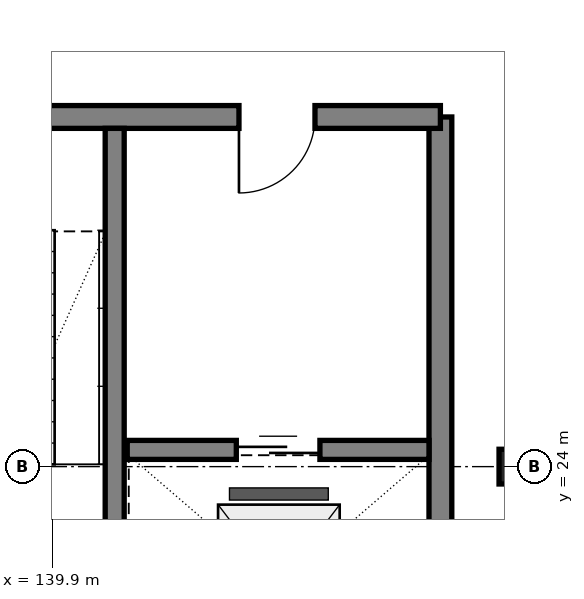
"""IFC4 building model, lengths in metres.
Left out: names, types, materials, properties, quantities, classifications, styles, units other than length and angle.
Written with IfcOpenShell. Run it as: python <this file> out.ifc"""

import sys

from ifc_helpers import new_model, si_unit, direction, frame, frame_2d, origin, origin_2d_with_axis, place, context, subcontext, project, spatial, rectangle, hollow_circle, extrude, element, fill, save


model = new_model("IFC4")
c1 = context("Model", 3, precision=1e-05, world=origin(), true_north=direction((0.0, 1.0)))
c2 = subcontext(c1, "Body", "Model", "MODEL_VIEW")
j1 = project(units=[si_unit("LENGTHUNIT", "METRE"), si_unit("PLANEANGLEUNIT", "RADIAN")], contexts=[c1])
p1 = place(None, origin())
s1 = spatial("IfcSite", under=j1, at=p1, CompositionType="ELEMENT")
p2 = place(p1, origin())
s2 = spatial("IfcBuilding", under=s1, at=p2, CompositionType="ELEMENT")
p3 = place(p2, origin())
s3 = spatial("IfcBuildingStorey", under=s2, at=p3, CompositionType="ELEMENT", Elevation=0.0)
p4 = place(p3, frame((146.0, 24.0, 0.0), z_axis=(0.0, 0.0, 1.0), x_axis=(1.0, 0.0, 0.0)))
e1 = element("IfcColumn", 1, at=p4, inside=s3, PredefinedType="COLUMN", context=c2, shape_type="SweptSolid", body=[
    extrude(hollow_circle(Radius=0.229, WallThickness=0.013, at=origin_2d_with_axis()), origin(), (0.0, 0.0, 1.0), 4.5),
])
p5 = place(p3, frame((145.0, 20.6, 0.0), z_axis=(0.0, 0.0, 1.0), x_axis=(0.0, 1.0, 0.0)))
e2 = element("IfcWall", 2, at=p5, inside=s3, PredefinedType="SHEAR", context=c2, shape_type="SweptSolid", body=[
    extrude(rectangle(XDim=8.0, YDim=0.3, at=frame_2d((4.0, 0.0), x_axis=(1.0, 0.0))), origin(), (0.0, 0.0, 1.0), 4.5),
])
p6 = place(p3, frame((145.0, 28.6, 0.0), z_axis=(0.0, 0.0, 1.0), x_axis=(-1.0, 0.0, 0.0)))
e3 = element("IfcWall", 3, at=p6, inside=s3, PredefinedType="SHEAR", context=c2, shape_type="SweptSolid", body=[
    extrude(rectangle(XDim=7.4, YDim=0.3, at=frame_2d((3.7, 0.0), x_axis=(1.0, 0.0))), origin(), (0.0, 0.0, 1.0), 4.5),
])
p7 = place(p6, frame((1.65, 0.0, 0.0)))
e4 = element("IfcOpeningElement", 4, at=p7, cuts=e3, PredefinedType="OPENING", context=c2, shape_type="SweptSolid", body=[
    extrude(rectangle(XDim=1.0, YDim=2.15, at=frame_2d((0.5, 1.075), x_axis=(1.0, 0.0))), frame((0.0, 0.16, 0.0), z_axis=(0.0, -1.0, 0.0), x_axis=(1.0, 0.0, 0.0)), (0.0, 0.0, 1.0), 0.32),
])
p8 = place(p6, frame((5.3, 0.0, 0.0)))
e5 = element("IfcOpeningElement", 5, at=p8, cuts=e3, PredefinedType="OPENING", context=c2, shape_type="SweptSolid", body=[
    extrude(rectangle(XDim=1.0, YDim=2.15, at=frame_2d((0.5, 1.075), x_axis=(1.0, 0.0))), frame((0.0, 0.16, 0.0), z_axis=(0.0, -1.0, 0.0), x_axis=(1.0, 0.0, 0.0)), (0.0, 0.0, 1.0), 0.32),
])
p9 = place(p3, frame((140.715, 20.75, 0.0), z_axis=(0.0, 0.0, 1.0), x_axis=(0.0, 1.0, 0.0)))
e6 = element("IfcWall", 6, at=p9, inside=s3, PredefinedType="SHEAR", context=c2, shape_type="SweptSolid", body=[
    extrude(rectangle(XDim=7.7, YDim=0.25, at=frame_2d((3.85, 0.0), x_axis=(1.0, 0.0))), origin(), (0.0, 0.0, 1.0), 4.5),
])
p10 = place(p3, frame((140.88, 24.22, 0.0), z_axis=(0.0, 0.0, 1.0), x_axis=(1.0, 0.0, 0.0)))
e7 = element("IfcWall", 7, at=p10, inside=s3, PredefinedType="SHEAR", context=c2, shape_type="SweptSolid", body=[
    extrude(rectangle(XDim=3.97, YDim=0.25, at=frame_2d((1.985, 0.0), x_axis=(1.0, 0.0))), origin(), (0.0, 0.0, 1.0), 4.24),
])
p11 = place(p10, frame((1.435, 0.0, 0.0)))
e8 = element("IfcOpeningElement", 8, at=p11, cuts=e7, PredefinedType="OPENING", context=c2, shape_type="SweptSolid", body=[
    extrude(rectangle(XDim=1.1, YDim=2.15, at=frame_2d((0.55, 1.075), x_axis=(1.0, 0.0))), frame((0.0, 0.135, 0.0), z_axis=(0.0, -1.0, 0.0), x_axis=(1.0, 0.0, 0.0)), (0.0, 0.0, 1.0), 0.27),
])
p12 = place(p7, origin())
e9 = element("IfcDoor", 9, at=p12, inside=s3, OperationType="SINGLE_SWING_RIGHT", PredefinedType="DOOR", context=c2, shape_type="SweptSolid", body=[
    extrude(rectangle(XDim=1.0, YDim=2.15, at=frame_2d((0.5, 1.075), x_axis=(1.0, 0.0))), frame((0.0, 0.025, 0.0), z_axis=(0.0, -1.0, 0.0), x_axis=(1.0, 0.0, 0.0)), (0.0, 0.0, 1.0), 0.05),
])
fill(e4, e9)
p13 = place(p11, origin())
e10 = element("IfcDoor", 10, at=p13, inside=s3, OperationType="SLIDING_TO_LEFT", PredefinedType="DOOR", context=c2, shape_type="SweptSolid", body=[
    extrude(rectangle(XDim=1.1, YDim=2.15, at=frame_2d((0.55, 1.075), x_axis=(1.0, 0.0))), frame((0.0, 0.025, 0.0), z_axis=(0.0, -1.0, 0.0), x_axis=(1.0, 0.0, 0.0)), (0.0, 0.0, 1.0), 0.05),
])
fill(e8, e10)
save(model, sys.argv[1])
